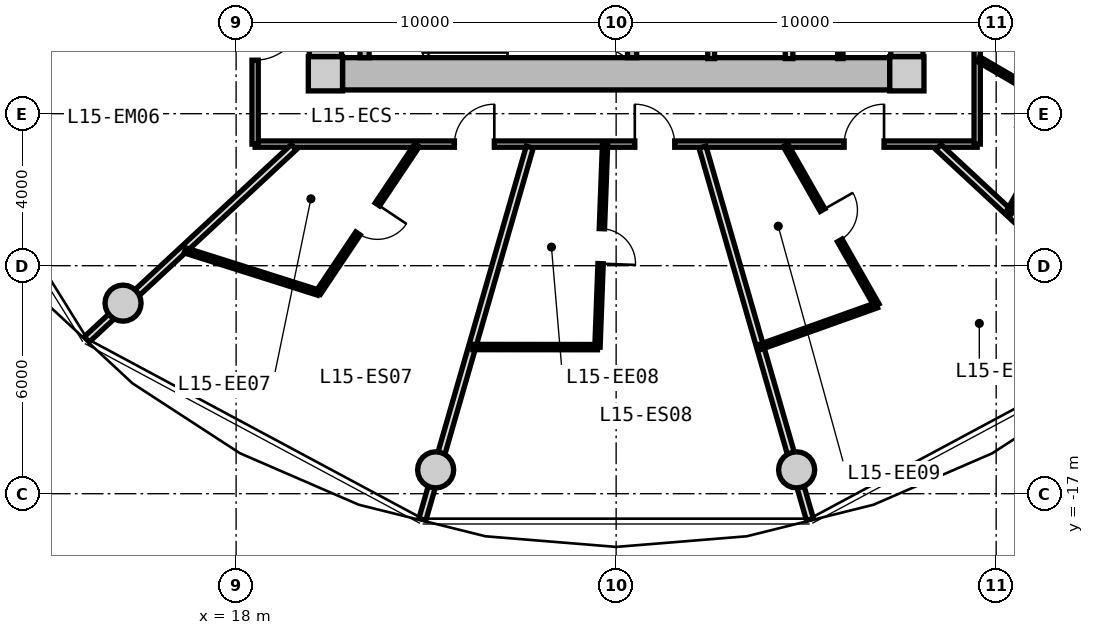
"""IFC4 building model, lengths in metres.
Left out: names, types, materials, properties, quantities, classifications, styles, units other than length and angle.
Written with IfcOpenShell. Run it as: python <this file> out.ifc"""

import sys

from ifc_helpers import new_model, si_unit, direction, frame, frame_2d, origin, origin_2d, place, context, subcontext, project, spatial, rectangle, circle, extrude, source, transform, mapped, element, fill, save


model = new_model("IFC4")
c1 = context("Model", 3, precision=1e-05, world=origin(), true_north=direction((0.0, 1.0)))
c2 = subcontext(c1, "Body", "Model", "MODEL_VIEW")
j1 = project(units=[si_unit("LENGTHUNIT", "METRE"), si_unit("PLANEANGLEUNIT", "RADIAN")], contexts=[c1])
p1 = place(None, origin())
s1 = spatial("IfcSite", under=j1, at=p1, CompositionType="ELEMENT")
p2 = place(p1, origin())
s2 = spatial("IfcBuilding", under=s1, at=p2, CompositionType="ELEMENT")
p3 = place(p2, frame((0.0, 0.0, 52.1)))
s3 = spatial("IfcBuildingStorey", under=s2, at=p3, CompositionType="ELEMENT", Elevation=52.1)
m1 = source(origin(), c2, "Body", "SweptSolid", [
    extrude(rectangle(XDim=0.9, YDim=0.9, at=origin_2d()), origin(), (0.0, 0.0, 1.0), 3.05),
])
for number, where, z_axis, x_axis in (
    (1, (20.35, -5.95, 0.0), (0.0, 0.0, 1.0), (1.0, 0.0, 0.0)),
    (2, (35.65, -5.95, 0.0), (0.0, 0.0, 1.0), (1.0, 0.0, 0.0)),
):
    element("IfcColumn", number, at=place(p3, frame(where, z_axis=z_axis, x_axis=x_axis)), inside=s3, PredefinedType="COLUMN", context=c2, shape_type="MappedRepresentation", body=[
        mapped(m1, transform((0.0, 0.0, 0.0), x_axis=(1.0, 0.0, 0.0), y_axis=(0.0, 1.0, 0.0), z_axis=(0.0, 0.0, 1.0), scale=1.0)),
    ])
m2 = source(origin(), c2, "Body", "SweptSolid", [
    extrude(rectangle(XDim=14.4, YDim=0.85, at=frame_2d((7.2, 0.0))), origin(), (0.0, 0.0, 1.0), 2.79),
])
p4 = place(p3, frame((35.2, -5.95, 0.0), z_axis=(0.0, 0.0, 1.0), x_axis=(-1.0, 0.0, 0.0)))
e3 = element("IfcWall", 3, at=p4, inside=s3, PredefinedType="SHEAR", context=c2, shape_type="MappedRepresentation", body=[
    mapped(m2, transform((0.0, 0.0, 0.0), x_axis=(1.0, 0.0, 0.0), y_axis=(0.0, 1.0, 0.0), z_axis=(0.0, 0.0, 1.0), scale=1.0)),
])
m3 = source(origin(), c2, "Body", "SweptSolid", [
    extrude(rectangle(XDim=11.0, YDim=0.85, at=frame_2d((5.5, 0.0))), origin(), (0.0, 0.0, 1.0), 2.79),
])
p5 = place(p3, frame((20.35, -5.5, 0.0), z_axis=(0.0, 0.0, 1.0), x_axis=(0.0, 1.0, 0.0)))
e4 = element("IfcWall", 4, at=p5, inside=s3, PredefinedType="SHEAR", context=c2, shape_type="MappedRepresentation", body=[
    mapped(m3, transform((0.0, 0.0, 0.0), x_axis=(1.0, 0.0, 0.0), y_axis=(0.0, 1.0, 0.0), z_axis=(0.0, 0.0, 1.0), scale=1.0)),
])
p6 = place(p5, frame((3.8, 0.0, 0.0)))
e5 = element("IfcOpeningElement", 5, at=p6, cuts=e4, PredefinedType="OPENING", context=c2, shape_type="SweptSolid", body=[
    extrude(rectangle(XDim=1.2, YDim=2.15, at=frame_2d((0.6, 1.075))), frame((0.0, 0.435, 0.0), z_axis=(0.0, -1.0, 0.0), x_axis=(1.0, 0.0, 0.0)), (0.0, 0.0, 1.0), 0.87),
])
p7 = place(p3, frame((35.65, 5.5, 0.0), z_axis=(0.0, 0.0, 1.0), x_axis=(0.0, -1.0, 0.0)))
e6 = element("IfcWall", 6, at=p7, inside=s3, PredefinedType="SHEAR", context=c2, shape_type="MappedRepresentation", body=[
    mapped(m3, transform((0.0, 0.0, 0.0), x_axis=(1.0, 0.0, 0.0), y_axis=(0.0, 1.0, 0.0), z_axis=(0.0, 0.0, 1.0), scale=1.0)),
])
p8 = place(p7, frame((5.65, 0.0, 0.0)))
e7 = element("IfcOpeningElement", 7, at=p8, cuts=e6, PredefinedType="OPENING", context=c2, shape_type="SweptSolid", body=[
    extrude(rectangle(XDim=1.2, YDim=2.15, at=frame_2d((0.6, 1.075))), frame((0.0, 0.435, 0.0), z_axis=(0.0, -1.0, 0.0), x_axis=(1.0, 0.0, 0.0)), (0.0, 0.0, 1.0), 0.87),
])
m4 = source(origin(), c2, "Body", "SweptSolid", [
    extrude(circle(Radius=0.475, at=origin_2d()), origin(), (0.0, 0.0, 1.0), 3.05),
])
for number, where, z_axis, x_axis in (
    (8, (15.025, -11.985, 0.0), (0.0, 0.0, 1.0), (1.0, 0.0, 0.0)),
    (9, (23.251, -16.373, 0.0), (0.0, 0.0, 1.0), (1.0, 0.0, 0.0)),
    (10, (32.749, -16.373, 0.0), (0.0, 0.0, 1.0), (1.0, 0.0, 0.0)),
):
    element("IfcColumn", number, at=place(p3, frame(where, z_axis=z_axis, x_axis=x_axis)), inside=s3, PredefinedType="COLUMN", context=c2, shape_type="MappedRepresentation", body=[
        mapped(m4, transform((0.0, 0.0, 0.0), x_axis=(1.0, 0.0, 0.0), y_axis=(0.0, 1.0, 0.0), z_axis=(0.0, 0.0, 1.0), scale=1.0)),
    ])
m5 = source(origin(), c2, "Body", "SweptSolid", [
    extrude(rectangle(XDim=3.075, YDim=0.24, at=frame_2d((1.538, 0.0))), origin(), (0.0, 0.0, 1.0), 2.79),
])
for number, where, z_axis, x_axis in (
    (11, (21.38, -5.525, 0.0), (0.0, 0.0, 1.0), (0.0, 1.0, 0.0)),
    (12, (28.42, -5.525, 0.0), (0.0, 0.0, 1.0), (0.0, 1.0, 0.0)),
):
    element("IfcWall", number, at=place(p3, frame(where, z_axis=z_axis, x_axis=x_axis)), inside=s3, PredefinedType="PARTITIONING", context=c2, shape_type="MappedRepresentation", body=[
        mapped(m5, transform((0.0, 0.0, 0.0), x_axis=(1.0, 0.0, 0.0), y_axis=(0.0, 1.0, 0.0), z_axis=(0.0, 0.0, 1.0), scale=1.0)),
    ])
m6 = source(origin(), c2, "Body", "SweptSolid", [
    extrude(rectangle(XDim=3.8, YDim=0.2, at=frame_2d((1.9, 0.0))), origin(), (0.0, 0.0, 1.0), 2.775),
])
p9 = place(p3, frame((32.55, -5.55, 0.0), z_axis=(0.0, 0.0, 1.0), x_axis=(0.0, 1.0, 0.0)))
e13 = element("IfcWall", 13, at=p9, inside=s3, PredefinedType="PARTITIONING", context=c2, shape_type="MappedRepresentation", body=[
    mapped(m6, transform((0.0, 0.0, 0.0), x_axis=(1.0, 0.0, 0.0), y_axis=(0.0, 1.0, 0.0), z_axis=(0.0, 0.0, 1.0), scale=1.0)),
])
m7 = source(origin(), c2, "Body", "SweptSolid", [
    extrude(rectangle(XDim=3.22, YDim=0.18, at=frame_2d((1.61, 0.0))), origin(), (0.0, 0.0, 1.0), 2.775),
])
p10 = place(p3, frame((30.5, -5.55, 0.0), z_axis=(0.0, 0.0, 1.0), x_axis=(0.0, 1.0, 0.0)))
e14 = element("IfcWall", 14, at=p10, inside=s3, PredefinedType="PARTITIONING", context=c2, shape_type="MappedRepresentation", body=[
    mapped(m7, transform((0.0, 0.0, 0.0), x_axis=(1.0, 0.0, 0.0), y_axis=(0.0, 1.0, 0.0), z_axis=(0.0, 0.0, 1.0), scale=1.0)),
])
m8 = source(origin(), c2, "Body", "SweptSolid", [
    extrude(rectangle(XDim=3.8, YDim=0.14, at=frame_2d((1.9, 0.0))), origin(), (0.0, 0.0, 1.0), 2.775),
])
p11 = place(p3, frame((33.9, -5.55, 0.0), z_axis=(0.0, 0.0, 1.0), x_axis=(0.0, 1.0, 0.0)))
e15 = element("IfcWall", 15, at=p11, inside=s3, PredefinedType="PARTITIONING", context=c2, shape_type="MappedRepresentation", body=[
    mapped(m8, transform((0.0, 0.0, 0.0), x_axis=(1.0, 0.0, 0.0), y_axis=(0.0, 1.0, 0.0), z_axis=(0.0, 0.0, 1.0), scale=1.0)),
])
m9 = source(origin(), c2, "Body", "SweptSolid", [
    extrude(rectangle(XDim=19.0, YDim=0.165, at=frame_2d((9.5, 0.0))), origin(), (0.0, 0.0, 1.0), 2.775),
])
p12 = place(p3, frame((37.5, -7.8, 0.0), z_axis=(0.0, 0.0, 1.0), x_axis=(-1.0, 0.0, 0.0)))
e16 = element("IfcWall", 16, at=p12, inside=s3, PredefinedType="PARTITIONING", context=c2, shape_type="MappedRepresentation", body=[
    mapped(m9, transform((0.0, 0.0, 0.0), x_axis=(1.0, 0.0, 0.0), y_axis=(0.0, 1.0, 0.0), z_axis=(0.0, 0.0, 1.0), scale=1.0)),
])
p13 = place(p12, frame((12.706, 0.0, 0.0)))
e17 = element("IfcOpeningElement", 17, at=p13, cuts=e16, PredefinedType="OPENING", context=c2, shape_type="SweptSolid", body=[
    extrude(rectangle(XDim=1.05, YDim=2.15, at=frame_2d((0.525, 1.075))), frame((0.0, 0.093, 0.0), z_axis=(0.0, -1.0, 0.0), x_axis=(1.0, 0.0, 0.0)), (0.0, 0.0, 1.0), 0.185),
])
p14 = place(p12, frame((7.959, 0.0, 0.0)))
e18 = element("IfcOpeningElement", 18, at=p14, cuts=e16, PredefinedType="OPENING", context=c2, shape_type="SweptSolid", body=[
    extrude(rectangle(XDim=1.05, YDim=2.15, at=frame_2d((0.525, 1.075))), frame((0.0, 0.093, 0.0), z_axis=(0.0, -1.0, 0.0), x_axis=(1.0, 0.0, 0.0)), (0.0, 0.0, 1.0), 0.185),
])
p15 = place(p12, frame((2.451, 0.0, 0.0)))
e19 = element("IfcOpeningElement", 19, at=p15, cuts=e16, PredefinedType="OPENING", context=c2, shape_type="SweptSolid", body=[
    extrude(rectangle(XDim=1.05, YDim=2.15, at=frame_2d((0.525, 1.075))), frame((0.0, 0.093, 0.0), z_axis=(0.0, -1.0, 0.0), x_axis=(1.0, 0.0, 0.0)), (0.0, 0.0, 1.0), 0.185),
])
m10 = source(origin(), c2, "Body", "SweptSolid", [
    extrude(rectangle(XDim=15.6, YDim=0.165, at=frame_2d((7.8, 0.0))), origin(), (0.0, 0.0, 1.0), 2.775),
])
p16 = place(p3, frame((18.5, -7.8, 0.0), z_axis=(0.0, 0.0, 1.0), x_axis=(0.0, 1.0, 0.0)))
e20 = element("IfcWall", 20, at=p16, inside=s3, PredefinedType="PARTITIONING", context=c2, shape_type="MappedRepresentation", body=[
    mapped(m10, transform((0.0, 0.0, 0.0), x_axis=(1.0, 0.0, 0.0), y_axis=(0.0, 1.0, 0.0), z_axis=(0.0, 0.0, 1.0), scale=1.0)),
])
p17 = place(p16, frame((12.141, 0.0, 0.0)))
e21 = element("IfcOpeningElement", 21, at=p17, cuts=e20, PredefinedType="OPENING", context=c2, shape_type="SweptSolid", body=[
    extrude(rectangle(XDim=1.25, YDim=2.2, at=frame_2d((0.625, 1.1))), frame((0.0, 0.093, 0.0), z_axis=(0.0, -1.0, 0.0), x_axis=(1.0, 0.0, 0.0)), (0.0, 0.0, 1.0), 0.185),
])
p18 = place(p16, frame((7.175, 0.0, 0.0)))
e22 = element("IfcOpeningElement", 22, at=p18, cuts=e20, PredefinedType="OPENING", context=c2, shape_type="SweptSolid", body=[
    extrude(rectangle(XDim=1.25, YDim=2.2, at=frame_2d((0.625, 1.1))), frame((0.0, 0.093, 0.0), z_axis=(0.0, -1.0, 0.0), x_axis=(1.0, 0.0, 0.0)), (0.0, 0.0, 1.0), 0.185),
])
p19 = place(p16, frame((2.208, 0.0, 0.0)))
e23 = element("IfcOpeningElement", 23, at=p19, cuts=e20, PredefinedType="OPENING", context=c2, shape_type="SweptSolid", body=[
    extrude(rectangle(XDim=1.25, YDim=2.2, at=frame_2d((0.625, 1.1))), frame((0.0, 0.093, 0.0), z_axis=(0.0, -1.0, 0.0), x_axis=(1.0, 0.0, 0.0)), (0.0, 0.0, 1.0), 0.185),
])
p20 = place(p3, frame((37.5, 7.8, 0.0), z_axis=(0.0, 0.0, 1.0), x_axis=(0.0, -1.0, 0.0)))
e24 = element("IfcWall", 24, at=p20, inside=s3, PredefinedType="PARTITIONING", context=c2, shape_type="MappedRepresentation", body=[
    mapped(m10, transform((0.0, 0.0, 0.0), x_axis=(1.0, 0.0, 0.0), y_axis=(0.0, 1.0, 0.0), z_axis=(0.0, 0.0, 1.0), scale=1.0)),
])
p21 = place(p20, frame((8.835, 0.0, 0.0)))
e25 = element("IfcOpeningElement", 25, at=p21, cuts=e24, PredefinedType="OPENING", context=c2, shape_type="SweptSolid", body=[
    extrude(rectangle(XDim=1.05, YDim=2.15, at=frame_2d((0.525, 1.075))), frame((0.0, 0.093, 0.0), z_axis=(0.0, -1.0, 0.0), x_axis=(1.0, 0.0, 0.0)), (0.0, 0.0, 1.0), 0.185),
])
p22 = place(p20, frame((2.208, 0.0, 0.0)))
e26 = element("IfcOpeningElement", 26, at=p22, cuts=e24, PredefinedType="OPENING", context=c2, shape_type="SweptSolid", body=[
    extrude(rectangle(XDim=1.25, YDim=2.2, at=frame_2d((0.625, 1.1))), frame((0.0, 0.093, 0.0), z_axis=(0.0, -1.0, 0.0), x_axis=(1.0, 0.0, 0.0)), (0.0, 0.0, 1.0), 0.185),
])
m11 = source(origin(), c2, "Body", "SweptSolid", [
    extrude(rectangle(XDim=7.435, YDim=0.19, at=frame_2d((3.717, 0.0))), origin(), (0.0, 0.0, 1.0), 2.225),
])
p23 = place(p3, frame((19.517, -7.88, 0.0), z_axis=(0.0, 0.0, 1.0), x_axis=(-0.732651956848, -0.680603489652, 0.0)))
e27 = element("IfcWall", 27, at=p23, inside=s3, PredefinedType="PARTITIONING", context=c2, shape_type="MappedRepresentation", body=[
    mapped(m11, transform((0.0, 0.0, 0.0), x_axis=(1.0, 0.0, 0.0), y_axis=(0.0, 1.0, 0.0), z_axis=(0.0, 0.0, 1.0), scale=1.0)),
])
m12 = source(origin(), c2, "Body", "SweptSolid", [
    extrude(rectangle(XDim=10.196, YDim=0.19, at=frame_2d((5.098, 0.0))), origin(), (0.0, 0.0, 1.0), 2.225),
])
p24 = place(p3, frame((25.727, -7.88, 0.0), z_axis=(0.0, 0.0, 1.0), x_axis=(-0.277136420347, -0.960830580549, 0.0)))
e28 = element("IfcWall", 28, at=p24, inside=s3, PredefinedType="PARTITIONING", context=c2, shape_type="MappedRepresentation", body=[
    mapped(m12, transform((0.0, 0.0, 0.0), x_axis=(1.0, 0.0, 0.0), y_axis=(0.0, 1.0, 0.0), z_axis=(0.0, 0.0, 1.0), scale=1.0)),
])
m13 = source(origin(), c2, "Body", "SweptSolid", [
    extrude(rectangle(XDim=4.668, YDim=0.14, at=frame_2d((2.334, 0.0))), origin(), (0.0, 0.0, 1.0), 2.775),
])
p25 = place(p3, frame((22.76, -7.83, 0.0), z_axis=(0.0, 0.0, 1.0), x_axis=(-0.55615986029, -0.83107533341, 0.0)))
e29 = element("IfcWall", 29, at=p25, inside=s3, PredefinedType="PARTITIONING", context=c2, shape_type="MappedRepresentation", body=[
    mapped(m13, transform((0.0, 0.0, 0.0), x_axis=(1.0, 0.0, 0.0), y_axis=(0.0, 1.0, 0.0), z_axis=(0.0, 0.0, 1.0), scale=1.0)),
])
p26 = place(p25, frame((1.874, 0.0, 0.0)))
e30 = element("IfcOpeningElement", 30, at=p26, cuts=e29, PredefinedType="OPENING", context=c2, shape_type="SweptSolid", body=[
    extrude(rectangle(XDim=0.92, YDim=2.1, at=frame_2d((0.46, 1.05))), frame((0.0, 0.08, 0.0), z_axis=(0.0, -1.0, 0.0), x_axis=(1.0, 0.0, 0.0)), (0.0, 0.0, 1.0), 0.16),
])
m14 = source(origin(), c2, "Body", "SweptSolid", [
    extrude(rectangle(XDim=3.684, YDim=0.14, at=frame_2d((1.842, 0.0))), origin(), (0.0, 0.0, 1.0), 2.775),
])
p27 = place(p3, frame((20.164, -11.709, 0.0), z_axis=(0.0, 0.0, 1.0), x_axis=(-0.953245538614, 0.302196861518, 0.0)))
e31 = element("IfcWall", 31, at=p27, inside=s3, PredefinedType="PARTITIONING", context=c2, shape_type="MappedRepresentation", body=[
    mapped(m14, transform((0.0, 0.0, 0.0), x_axis=(1.0, 0.0, 0.0), y_axis=(0.0, 1.0, 0.0), z_axis=(0.0, 0.0, 1.0), scale=1.0)),
])
p28 = place(p3, frame((30.273, -7.88, 0.0), z_axis=(0.0, 0.0, 1.0), x_axis=(0.277136420347, -0.960830580549, 0.0)))
e32 = element("IfcWall", 32, at=p28, inside=s3, PredefinedType="PARTITIONING", context=c2, shape_type="MappedRepresentation", body=[
    mapped(m12, transform((0.0, 0.0, 0.0), x_axis=(1.0, 0.0, 0.0), y_axis=(0.0, 1.0, 0.0), z_axis=(0.0, 0.0, 1.0), scale=1.0)),
])
m15 = source(origin(), c2, "Body", "SweptSolid", [
    extrude(rectangle(XDim=5.316, YDim=0.14, at=frame_2d((2.658, 0.0))), origin(), (0.0, 0.0, 1.0), 2.775),
])
p29 = place(p3, frame((27.707, -7.83, 0.0), z_axis=(0.0, 0.0, 1.0), x_axis=(-0.037380226447, -0.999301115115, 0.0)))
e33 = element("IfcWall", 33, at=p29, inside=s3, PredefinedType="PARTITIONING", context=c2, shape_type="MappedRepresentation", body=[
    mapped(m15, transform((0.0, 0.0, 0.0), x_axis=(1.0, 0.0, 0.0), y_axis=(0.0, 1.0, 0.0), z_axis=(0.0, 0.0, 1.0), scale=1.0)),
])
p30 = place(p29, frame((2.198, 0.0, 0.0)))
e34 = element("IfcOpeningElement", 34, at=p30, cuts=e33, PredefinedType="OPENING", context=c2, shape_type="SweptSolid", body=[
    extrude(rectangle(XDim=0.92, YDim=2.1, at=frame_2d((0.46, 1.05))), frame((0.0, 0.08, 0.0), z_axis=(0.0, -1.0, 0.0), x_axis=(1.0, 0.0, 0.0)), (0.0, 0.0, 1.0), 0.16),
])
m16 = source(origin(), c2, "Body", "SweptSolid", [
    extrude(rectangle(XDim=3.279, YDim=0.14, at=frame_2d((1.64, 0.0))), origin(), (0.0, 0.0, 1.0), 2.775),
])
p31 = place(p3, frame((27.509, -13.143, 0.0), z_axis=(0.0, 0.0, 1.0), x_axis=(-0.999999664619, 0.000819000544, 0.0)))
e35 = element("IfcWall", 35, at=p31, inside=s3, PredefinedType="PARTITIONING", context=c2, shape_type="MappedRepresentation", body=[
    mapped(m16, transform((0.0, 0.0, 0.0), x_axis=(1.0, 0.0, 0.0), y_axis=(0.0, 1.0, 0.0), z_axis=(0.0, 0.0, 1.0), scale=1.0)),
])
p32 = place(p3, frame((36.483, -7.88, 0.0), z_axis=(0.0, 0.0, 1.0), x_axis=(0.732651956848, -0.680603489652, 0.0)))
e36 = element("IfcWall", 36, at=p32, inside=s3, PredefinedType="PARTITIONING", context=c2, shape_type="MappedRepresentation", body=[
    mapped(m11, transform((0.0, 0.0, 0.0), x_axis=(1.0, 0.0, 0.0), y_axis=(0.0, 1.0, 0.0), z_axis=(0.0, 0.0, 1.0), scale=1.0)),
])
m17 = source(origin(), c2, "Body", "SweptSolid", [
    extrude(rectangle(XDim=4.846, YDim=0.14, at=frame_2d((2.423, 0.0))), origin(), (0.0, 0.0, 1.0), 2.775),
])
p33 = place(p3, frame((32.458, -7.83, 0.0), z_axis=(0.0, 0.0, 1.0), x_axis=(0.494841788743, -0.868983086207, 0.0)))
e37 = element("IfcWall", 37, at=p33, inside=s3, PredefinedType="PARTITIONING", context=c2, shape_type="MappedRepresentation", body=[
    mapped(m17, transform((0.0, 0.0, 0.0), x_axis=(1.0, 0.0, 0.0), y_axis=(0.0, 1.0, 0.0), z_axis=(0.0, 0.0, 1.0), scale=1.0)),
])
p34 = place(p33, frame((1.963, 0.0, 0.0)))
e38 = element("IfcOpeningElement", 38, at=p34, cuts=e37, PredefinedType="OPENING", context=c2, shape_type="SweptSolid", body=[
    extrude(rectangle(XDim=0.92, YDim=2.1, at=frame_2d((0.46, 1.05))), frame((0.0, 0.08, 0.0), z_axis=(0.0, -1.0, 0.0), x_axis=(1.0, 0.0, 0.0)), (0.0, 0.0, 1.0), 0.16),
])
m18 = source(origin(), c2, "Body", "SweptSolid", [
    extrude(rectangle(XDim=3.276, YDim=0.14, at=frame_2d((1.638, 0.0))), origin(), (0.0, 0.0, 1.0), 2.415),
])
p35 = place(p3, frame((34.857, -12.042, 0.0), z_axis=(0.0, 0.0, 1.0), x_axis=(-0.94174696961, -0.336322234221, 0.0)))
e39 = element("IfcWall", 39, at=p35, inside=s3, PredefinedType="PARTITIONING", context=c2, shape_type="MappedRepresentation", body=[
    mapped(m18, transform((0.0, 0.0, 0.0), x_axis=(1.0, 0.0, 0.0), y_axis=(0.0, 1.0, 0.0), z_axis=(0.0, 0.0, 1.0), scale=1.0)),
])
m19 = source(origin(), c2, "Body", "SweptSolid", [
    extrude(rectangle(XDim=2.669, YDim=0.14, at=frame_2d((1.335, 0.0))), origin(), (0.0, 0.0, 1.0), 2.775),
])
p36 = place(p3, frame((37.53, -5.561, 0.0), z_axis=(0.0, 0.0, 1.0), x_axis=(0.86369928178, -0.50400749067, 0.0)))
e40 = element("IfcWall", 40, at=p36, inside=s3, PredefinedType="PARTITIONING", context=c2, shape_type="MappedRepresentation", body=[
    mapped(m19, transform((0.0, 0.0, 0.0), x_axis=(1.0, 0.0, 0.0), y_axis=(0.0, 1.0, 0.0), z_axis=(0.0, 0.0, 1.0), scale=1.0)),
])
m20 = source(origin(), c2, "Body", "SweptSolid", [
    extrude(rectangle(XDim=3.121, YDim=0.14, at=frame_2d((1.561, 0.0))), origin(), (0.0, 0.0, 1.0), 2.775),
])
p37 = place(p3, frame((39.836, -6.906, 0.0), z_axis=(0.0, 0.0, 1.0), x_axis=(-0.487302357327, -0.873233309342, 0.0)))
e41 = element("IfcWall", 41, at=p37, inside=s3, PredefinedType="PARTITIONING", context=c2, shape_type="MappedRepresentation", body=[
    mapped(m20, transform((0.0, 0.0, 0.0), x_axis=(1.0, 0.0, 0.0), y_axis=(0.0, 1.0, 0.0), z_axis=(0.0, 0.0, 1.0), scale=1.0)),
])
p38 = place(p37, frame((1.101, 0.0, 0.0)))
e42 = element("IfcOpeningElement", 42, at=p38, cuts=e41, PredefinedType="OPENING", context=c2, shape_type="SweptSolid", body=[
    extrude(rectangle(XDim=0.92, YDim=2.1, at=frame_2d((0.46, 1.05))), frame((0.0, 0.08, 0.0), z_axis=(0.0, -1.0, 0.0), x_axis=(1.0, 0.0, 0.0)), (0.0, 0.0, 1.0), 0.16),
])
m21 = source(origin(), c2, "Body", "SweptSolid", [
    extrude(rectangle(XDim=1.25, YDim=2.2, at=frame_2d((0.625, 1.1))), frame((0.0, 0.025, 0.0), z_axis=(0.0, -1.0, 0.0), x_axis=(1.0, 0.0, 0.0)), (0.0, 0.0, 1.0), 0.05),
])
p39 = place(p19, frame((1.25, 0.0, 0.0), z_axis=(0.0, 0.0, 1.0), x_axis=(-1.0, 0.0, 0.0)))
e43 = element("IfcDoor", 43, at=p39, inside=s3, OperationType="SINGLE_SWING_LEFT", PredefinedType="DOOR", context=c2, shape_type="MappedRepresentation", body=[
    mapped(m21, transform((0.0, 0.0, 0.0), x_axis=(1.0, 0.0, 0.0), y_axis=(0.0, 1.0, 0.0), z_axis=(0.0, 0.0, 1.0), scale=1.0)),
])
fill(e23, e43)
m22 = source(origin(), c2, "Body", "SweptSolid", [
    extrude(rectangle(XDim=1.05, YDim=2.15, at=frame_2d((0.525, 1.075))), frame((0.0, 0.025, 0.0), z_axis=(0.0, -1.0, 0.0), x_axis=(1.0, 0.0, 0.0)), (0.0, 0.0, 1.0), 0.05),
])
p40 = place(p13, frame((1.05, 0.0, 0.0), z_axis=(0.0, 0.0, 1.0), x_axis=(-1.0, 0.0, 0.0)))
e44 = element("IfcDoor", 44, at=p40, inside=s3, OperationType="SINGLE_SWING_RIGHT", PredefinedType="DOOR", context=c2, shape_type="MappedRepresentation", body=[
    mapped(m22, transform((0.0, 0.0, 0.0), x_axis=(1.0, 0.0, 0.0), y_axis=(0.0, 1.0, 0.0), z_axis=(0.0, 0.0, 1.0), scale=1.0)),
])
fill(e17, e44)
m23 = source(origin(), c2, "Body", "SweptSolid", [
    extrude(rectangle(XDim=0.92, YDim=2.1, at=frame_2d((0.46, 1.05))), frame((0.0, 0.025, 0.0), z_axis=(0.0, -1.0, 0.0), x_axis=(1.0, 0.0, 0.0)), (0.0, 0.0, 1.0), 0.05),
])
p41 = place(p26, origin())
e45 = element("IfcDoor", 45, at=p41, inside=s3, OperationType="SINGLE_SWING_LEFT", PredefinedType="DOOR", context=c2, shape_type="MappedRepresentation", body=[
    mapped(m23, transform((0.0, 0.0, 0.0), x_axis=(1.0, 0.0, 0.0), y_axis=(0.0, 1.0, 0.0), z_axis=(0.0, 0.0, 1.0), scale=1.0)),
])
fill(e30, e45)
p42 = place(p14, frame((1.05, 0.0, 0.0), z_axis=(0.0, 0.0, 1.0), x_axis=(-1.0, 0.0, 0.0)))
e46 = element("IfcDoor", 46, at=p42, inside=s3, OperationType="SINGLE_SWING_LEFT", PredefinedType="DOOR", context=c2, shape_type="MappedRepresentation", body=[
    mapped(m22, transform((0.0, 0.0, 0.0), x_axis=(1.0, 0.0, 0.0), y_axis=(0.0, 1.0, 0.0), z_axis=(0.0, 0.0, 1.0), scale=1.0)),
])
fill(e18, e46)
p43 = place(p30, origin())
e47 = element("IfcDoor", 47, at=p43, inside=s3, OperationType="SINGLE_SWING_RIGHT", PredefinedType="DOOR", context=c2, shape_type="MappedRepresentation", body=[
    mapped(m23, transform((0.0, 0.0, 0.0), x_axis=(1.0, 0.0, 0.0), y_axis=(0.0, 1.0, 0.0), z_axis=(0.0, 0.0, 1.0), scale=1.0)),
])
fill(e34, e47)
p44 = place(p15, frame((1.05, 0.0, 0.0), z_axis=(0.0, 0.0, 1.0), x_axis=(-1.0, 0.0, 0.0)))
e48 = element("IfcDoor", 48, at=p44, inside=s3, OperationType="SINGLE_SWING_RIGHT", PredefinedType="DOOR", context=c2, shape_type="MappedRepresentation", body=[
    mapped(m22, transform((0.0, 0.0, 0.0), x_axis=(1.0, 0.0, 0.0), y_axis=(0.0, 1.0, 0.0), z_axis=(0.0, 0.0, 1.0), scale=1.0)),
])
fill(e19, e48)
p45 = place(p34, origin())
e49 = element("IfcDoor", 49, at=p45, inside=s3, OperationType="SINGLE_SWING_LEFT", PredefinedType="DOOR", context=c2, shape_type="MappedRepresentation", body=[
    mapped(m23, transform((0.0, 0.0, 0.0), x_axis=(1.0, 0.0, 0.0), y_axis=(0.0, 1.0, 0.0), z_axis=(0.0, 0.0, 1.0), scale=1.0)),
])
fill(e38, e49)
save(model, sys.argv[1])
